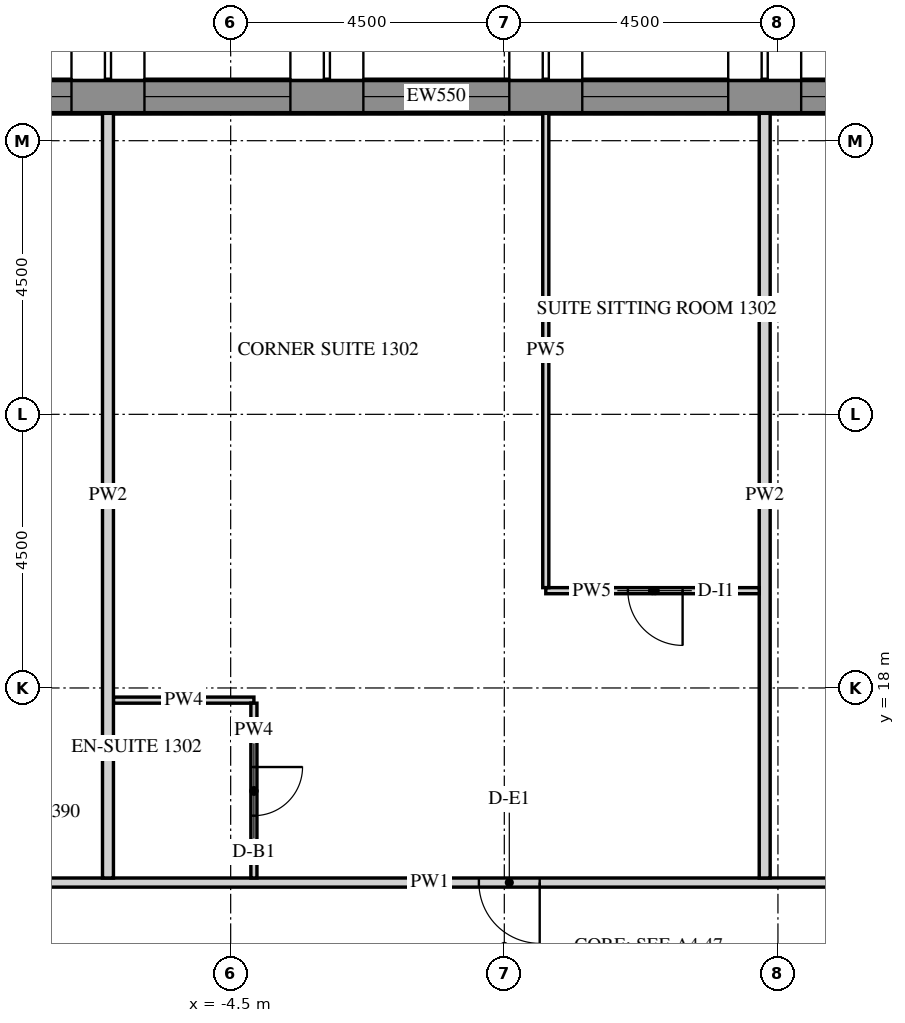
"""IFC4 building model, lengths in metres.
Left out: names, types, materials, properties, quantities, classifications, styles, units other than length and angle.
Written with IfcOpenShell. Run it as: python <this file> out.ifc"""

import sys

from ifc_helpers import new_model, si_unit, direction, frame, frame_2d, origin, place, context, subcontext, project, spatial, polyline, rectangle, outline, extrude, element, fill, save


model = new_model("IFC4")
c1 = context("Model", 3, precision=1e-05, world=origin(), true_north=direction((0.0, 1.0)))
c2 = subcontext(c1, "Body", "Model", "MODEL_VIEW")
j1 = project(units=[si_unit("LENGTHUNIT", "METRE"), si_unit("PLANEANGLEUNIT", "RADIAN")], contexts=[c1])
p1 = place(None, origin())
s1 = spatial("IfcSite", under=j1, at=p1, CompositionType="ELEMENT")
p2 = place(p1, origin())
s2 = spatial("IfcBuilding", under=s1, at=p2, CompositionType="ELEMENT")
p3 = place(p2, frame((0.0, 0.0, 176.1)))
s3 = spatial("IfcBuildingStorey", under=s2, at=p3, CompositionType="ELEMENT", Elevation=176.1)
p4 = place(p3, frame((12.761, 27.725, -0.15), z_axis=(0.0, 0.0, 1.0), x_axis=(-1.0, 0.0, 0.0)))
e1 = element("IfcWall", 1, at=p4, inside=s3, PredefinedType="SOLIDWALL", context=c2, shape_type="SweptSolid", body=[
    extrude(outline(polyline([(-0.022, -0.275), (27.783, -0.275), (27.732, 0.275), (0.022, 0.275), (-0.022, -0.275)])), origin(), (0.0, 0.0, 1.0), 3.9),
])
p5 = place(p4, frame((1.879, 0.0, 1.05)))
e2 = element("IfcOpeningElement", 2, at=p5, cuts=e1, PredefinedType="OPENING", context=c2, shape_type="SweptSolid", body=[
    extrude(rectangle(XDim=2.4, YDim=2.4, at=frame_2d((1.2, 1.2))), frame((0.0, 0.285, 0.0), z_axis=(0.0, -1.0, 0.0), x_axis=(1.0, 0.0, 0.0)), (0.0, 0.0, 1.0), 0.57),
])
p6 = place(p4, frame((5.479, 0.0, 1.05)))
e3 = element("IfcOpeningElement", 3, at=p6, cuts=e1, PredefinedType="OPENING", context=c2, shape_type="SweptSolid", body=[
    extrude(rectangle(XDim=2.4, YDim=2.4, at=frame_2d((1.2, 1.2))), frame((0.0, 0.285, 0.0), z_axis=(0.0, -1.0, 0.0), x_axis=(1.0, 0.0, 0.0)), (0.0, 0.0, 1.0), 0.57),
])
p7 = place(p4, frame((9.079, 0.0, 1.05)))
e4 = element("IfcOpeningElement", 4, at=p7, cuts=e1, PredefinedType="OPENING", context=c2, shape_type="SweptSolid", body=[
    extrude(rectangle(XDim=2.4, YDim=2.4, at=frame_2d((1.2, 1.2))), frame((0.0, 0.285, 0.0), z_axis=(0.0, -1.0, 0.0), x_axis=(1.0, 0.0, 0.0)), (0.0, 0.0, 1.0), 0.57),
])
p8 = place(p4, frame((12.679, 0.0, 1.05)))
e5 = element("IfcOpeningElement", 5, at=p8, cuts=e1, PredefinedType="OPENING", context=c2, shape_type="SweptSolid", body=[
    extrude(rectangle(XDim=2.4, YDim=2.4, at=frame_2d((1.2, 1.2))), frame((0.0, 0.285, 0.0), z_axis=(0.0, -1.0, 0.0), x_axis=(1.0, 0.0, 0.0)), (0.0, 0.0, 1.0), 0.57),
])
p9 = place(p4, frame((16.279, 0.0, 1.05)))
e6 = element("IfcOpeningElement", 6, at=p9, cuts=e1, PredefinedType="OPENING", context=c2, shape_type="SweptSolid", body=[
    extrude(rectangle(XDim=2.4, YDim=2.4, at=frame_2d((1.2, 1.2))), frame((0.0, 0.285, 0.0), z_axis=(0.0, -1.0, 0.0), x_axis=(1.0, 0.0, 0.0)), (0.0, 0.0, 1.0), 0.57),
])
p10 = place(p4, frame((19.879, 0.0, 1.05)))
e7 = element("IfcOpeningElement", 7, at=p10, cuts=e1, PredefinedType="OPENING", context=c2, shape_type="SweptSolid", body=[
    extrude(rectangle(XDim=2.4, YDim=2.4, at=frame_2d((1.2, 1.2))), frame((0.0, 0.285, 0.0), z_axis=(0.0, -1.0, 0.0), x_axis=(1.0, 0.0, 0.0)), (0.0, 0.0, 1.0), 0.57),
])
p11 = place(p4, frame((23.479, 0.0, 1.05)))
e8 = element("IfcOpeningElement", 8, at=p11, cuts=e1, PredefinedType="OPENING", context=c2, shape_type="SweptSolid", body=[
    extrude(rectangle(XDim=2.4, YDim=2.4, at=frame_2d((1.2, 1.2))), frame((0.0, 0.285, 0.0), z_axis=(0.0, -1.0, 0.0), x_axis=(1.0, 0.0, 0.0)), (0.0, 0.0, 1.0), 0.57),
])
p12 = place(p3, frame((6.091, 14.8, 0.0), z_axis=(0.0, 0.0, 1.0), x_axis=(-1.0, 0.0, 0.0)))
e9 = element("IfcWall", 9, at=p12, inside=s3, PredefinedType="PARTITIONING", context=c2, shape_type="SweptSolid", body=[
    extrude(rectangle(XDim=14.636, YDim=0.15, at=frame_2d((7.318, 0.0))), origin(), (0.0, 0.0, 1.0), 2.988),
])
p13 = place(p12, frame((5.509, 0.0, 0.0)))
e10 = element("IfcOpeningElement", 10, at=p13, cuts=e9, PredefinedType="OPENING", context=c2, shape_type="SweptSolid", body=[
    extrude(rectangle(XDim=1.0, YDim=2.1, at=frame_2d((0.5, 1.05))), frame((0.0, 0.085, 0.0), z_axis=(0.0, -1.0, 0.0), x_axis=(1.0, 0.0, 0.0)), (0.0, 0.0, 1.0), 0.17),
])
p14 = place(p3, frame((4.282, 27.45, 0.0), z_axis=(0.0, 0.0, 1.0), x_axis=(0.0, -1.0, 0.0)))
e11 = element("IfcWall", 11, at=p14, inside=s3, PredefinedType="PARTITIONING", context=c2, shape_type="SweptSolid", body=[
    extrude(rectangle(XDim=12.575, YDim=0.18, at=frame_2d((6.288, 0.0))), origin(), (0.0, 0.0, 1.0), 2.988),
])
p15 = place(p3, frame((-6.428, 17.8, 0.0), z_axis=(0.0, 0.0, 1.0), x_axis=(1.0, 0.0, 0.0)))
e12 = element("IfcWall", 12, at=p15, inside=s3, PredefinedType="PARTITIONING", context=c2, shape_type="SweptSolid", body=[
    extrude(rectangle(XDim=2.31, YDim=0.1, at=frame_2d((1.155, 0.0))), origin(), (0.0, 0.0, 1.0), 2.988),
])
p16 = place(p3, frame((-4.118, 17.75, 0.0), z_axis=(0.0, 0.0, 1.0), x_axis=(0.0, -1.0, 0.0)))
e13 = element("IfcWall", 13, at=p16, inside=s3, PredefinedType="PARTITIONING", context=c2, shape_type="SweptSolid", body=[
    extrude(rectangle(XDim=2.875, YDim=0.1, at=frame_2d((1.438, 0.0))), origin(), (0.0, 0.0, 1.0), 2.988),
])
p17 = place(p16, frame((1.05, 0.0, 0.0)))
e14 = element("IfcOpeningElement", 14, at=p17, cuts=e13, PredefinedType="OPENING", context=c2, shape_type="SweptSolid", body=[
    extrude(rectangle(XDim=0.8, YDim=2.1, at=frame_2d((0.4, 1.05))), frame((0.0, 0.06, 0.0), z_axis=(0.0, -1.0, 0.0), x_axis=(1.0, 0.0, 0.0)), (0.0, 0.0, 1.0), 0.12),
])
p18 = place(p3, frame((4.192, 19.6, 0.0), z_axis=(0.0, 0.0, 1.0), x_axis=(-1.0, 0.0, 0.0)))
e15 = element("IfcWall", 15, at=p18, inside=s3, PredefinedType="PARTITIONING", context=c2, shape_type="SweptSolid", body=[
    extrude(rectangle(XDim=3.51, YDim=0.1, at=frame_2d((1.755, 0.0))), origin(), (0.0, 0.0, 1.0), 2.988),
])
p19 = place(p18, frame((1.26, 0.0, 0.0)))
e16 = element("IfcOpeningElement", 16, at=p19, cuts=e15, PredefinedType="OPENING", context=c2, shape_type="SweptSolid", body=[
    extrude(rectangle(XDim=0.9, YDim=2.1, at=frame_2d((0.45, 1.05))), frame((0.0, 0.06, 0.0), z_axis=(0.0, -1.0, 0.0), x_axis=(1.0, 0.0, 0.0)), (0.0, 0.0, 1.0), 0.12),
])
p20 = place(p3, frame((0.682, 19.65, 0.0), z_axis=(0.0, 0.0, 1.0), x_axis=(0.0, 1.0, 0.0)))
e17 = element("IfcWall", 17, at=p20, inside=s3, PredefinedType="PARTITIONING", context=c2, shape_type="SweptSolid", body=[
    extrude(rectangle(XDim=7.8, YDim=0.1, at=frame_2d((3.9, 0.0))), origin(), (0.0, 0.0, 1.0), 2.988),
])
p21 = place(p3, frame((-6.518, 27.45, 0.0), z_axis=(0.0, 0.0, 1.0), x_axis=(0.0, -1.0, 0.0)))
e18 = element("IfcWall", 18, at=p21, inside=s3, PredefinedType="PARTITIONING", context=c2, shape_type="SweptSolid", body=[
    extrude(rectangle(XDim=12.575, YDim=0.18, at=frame_2d((6.288, 0.0))), origin(), (0.0, 0.0, 1.0), 2.988),
])
p22 = place(p6, frame((0.0, 0.205, 0.0)))
e19 = element("IfcWindow", 19, at=p22, inside=s3, PartitioningType="DOUBLE_PANEL_VERTICAL", PredefinedType="WINDOW", context=c2, shape_type="SweptSolid", body=[
    extrude(rectangle(XDim=2.4, YDim=2.4, at=frame_2d((1.2, 1.2))), frame((0.0, 0.03, 0.0), z_axis=(0.0, -1.0, 0.0), x_axis=(1.0, 0.0, 0.0)), (0.0, 0.0, 1.0), 0.06),
])
fill(e3, e19)
p23 = place(p7, frame((0.0, 0.205, 0.0)))
e20 = element("IfcWindow", 20, at=p23, inside=s3, PartitioningType="DOUBLE_PANEL_VERTICAL", PredefinedType="WINDOW", context=c2, shape_type="SweptSolid", body=[
    extrude(rectangle(XDim=2.4, YDim=2.4, at=frame_2d((1.2, 1.2))), frame((0.0, 0.03, 0.0), z_axis=(0.0, -1.0, 0.0), x_axis=(1.0, 0.0, 0.0)), (0.0, 0.0, 1.0), 0.06),
])
fill(e4, e20)
p24 = place(p8, frame((0.0, 0.205, 0.0)))
e21 = element("IfcWindow", 21, at=p24, inside=s3, PartitioningType="DOUBLE_PANEL_VERTICAL", PredefinedType="WINDOW", context=c2, shape_type="SweptSolid", body=[
    extrude(rectangle(XDim=2.4, YDim=2.4, at=frame_2d((1.2, 1.2))), frame((0.0, 0.03, 0.0), z_axis=(0.0, -1.0, 0.0), x_axis=(1.0, 0.0, 0.0)), (0.0, 0.0, 1.0), 0.06),
])
fill(e5, e21)
p25 = place(p9, frame((0.0, 0.205, 0.0)))
e22 = element("IfcWindow", 22, at=p25, inside=s3, PartitioningType="DOUBLE_PANEL_VERTICAL", PredefinedType="WINDOW", context=c2, shape_type="SweptSolid", body=[
    extrude(rectangle(XDim=2.4, YDim=2.4, at=frame_2d((1.2, 1.2))), frame((0.0, 0.03, 0.0), z_axis=(0.0, -1.0, 0.0), x_axis=(1.0, 0.0, 0.0)), (0.0, 0.0, 1.0), 0.06),
])
fill(e6, e22)
p26 = place(p10, frame((0.0, 0.205, 0.0)))
e23 = element("IfcWindow", 23, at=p26, inside=s3, PartitioningType="DOUBLE_PANEL_VERTICAL", PredefinedType="WINDOW", context=c2, shape_type="SweptSolid", body=[
    extrude(rectangle(XDim=2.4, YDim=2.4, at=frame_2d((1.2, 1.2))), frame((0.0, 0.03, 0.0), z_axis=(0.0, -1.0, 0.0), x_axis=(1.0, 0.0, 0.0)), (0.0, 0.0, 1.0), 0.06),
])
fill(e7, e23)
p27 = place(p13, origin())
e24 = element("IfcDoor", 24, at=p27, inside=s3, OperationType="SINGLE_SWING_RIGHT", PredefinedType="DOOR", context=c2, shape_type="SweptSolid", body=[
    extrude(rectangle(XDim=1.0, YDim=2.1, at=frame_2d((0.5, 1.05))), frame((0.0, 0.025, 0.0), z_axis=(0.0, -1.0, 0.0), x_axis=(1.0, 0.0, 0.0)), (0.0, 0.0, 1.0), 0.05),
])
fill(e10, e24)
p28 = place(p17, origin())
e25 = element("IfcDoor", 25, at=p28, inside=s3, OperationType="SINGLE_SWING_LEFT", PredefinedType="DOOR", context=c2, shape_type="SweptSolid", body=[
    extrude(rectangle(XDim=0.8, YDim=2.1, at=frame_2d((0.4, 1.05))), frame((0.0, 0.025, 0.0), z_axis=(0.0, -1.0, 0.0), x_axis=(1.0, 0.0, 0.0)), (0.0, 0.0, 1.0), 0.05),
])
fill(e14, e25)
p29 = place(p19, origin())
e26 = element("IfcDoor", 26, at=p29, inside=s3, OperationType="SINGLE_SWING_RIGHT", PredefinedType="DOOR", context=c2, shape_type="SweptSolid", body=[
    extrude(rectangle(XDim=0.9, YDim=2.1, at=frame_2d((0.45, 1.05))), frame((0.0, 0.025, 0.0), z_axis=(0.0, -1.0, 0.0), x_axis=(1.0, 0.0, 0.0)), (0.0, 0.0, 1.0), 0.05),
])
fill(e16, e26)
save(model, sys.argv[1])
